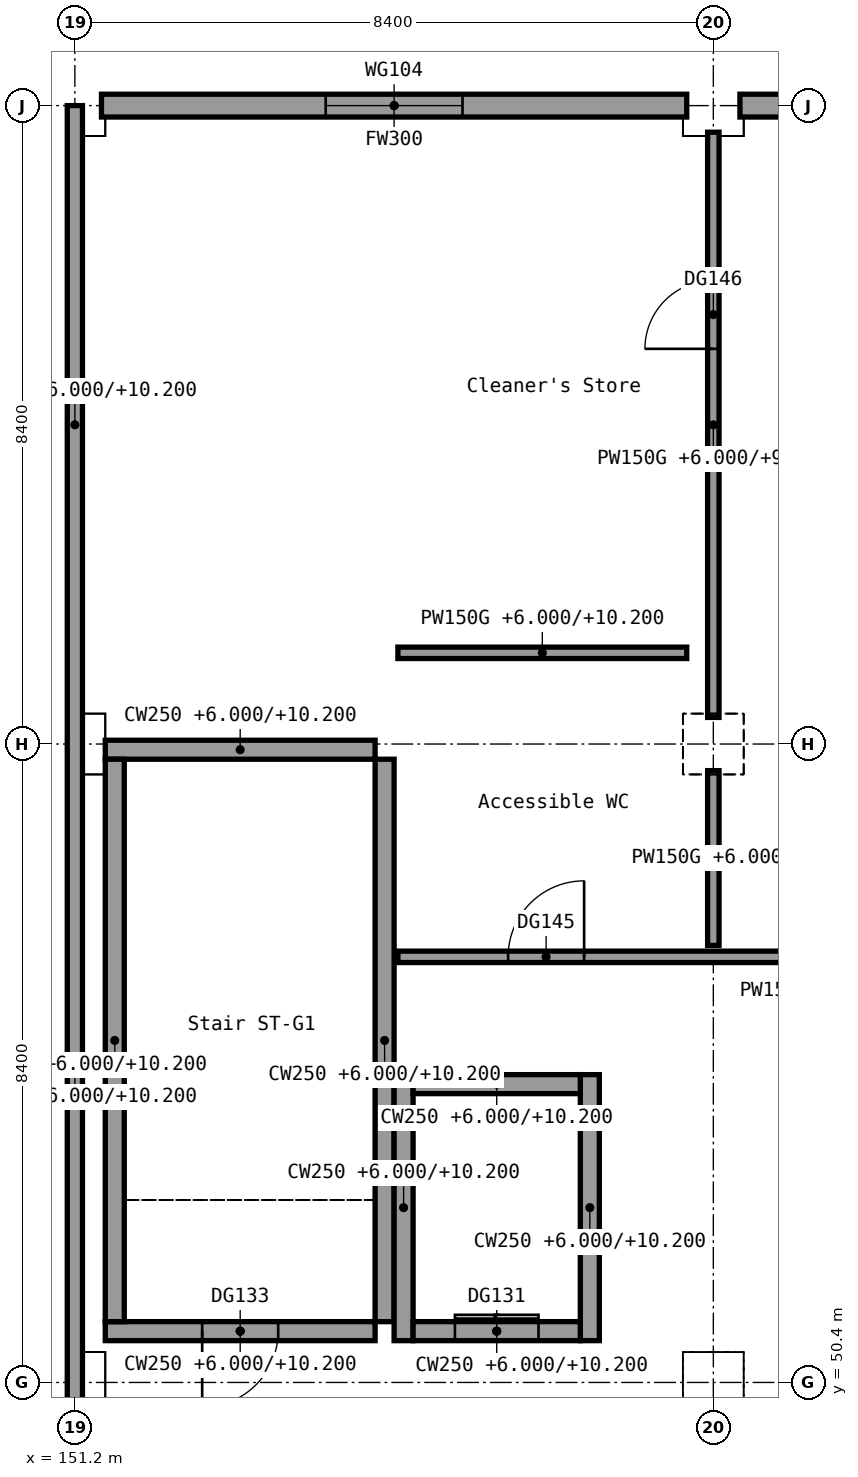
"""IFC4 building model, lengths in metres.
Left out: names, types, materials, properties, quantities, classifications, styles, units other than length and angle.
Written with IfcOpenShell. Run it as: python <this file> out.ifc"""

import sys

from ifc_helpers import new_model, si_unit, direction, frame, frame_2d, origin, origin_2d, place, context, subcontext, project, spatial, rectangle, extrude, element, fill, save


model = new_model("IFC4")
c1 = context("Model", 3, precision=1e-05, world=origin(), true_north=direction((0.0, 1.0)))
c2 = subcontext(c1, "Body", "Model", "MODEL_VIEW")
j1 = project(units=[si_unit("LENGTHUNIT", "METRE"), si_unit("PLANEANGLEUNIT", "RADIAN")], contexts=[c1])
p1 = place(None, origin())
s1 = spatial("IfcSite", under=j1, at=p1, CompositionType="ELEMENT")
p2 = place(p1, origin())
s2 = spatial("IfcBuilding", under=s1, at=p2, CompositionType="ELEMENT")
p3 = place(p2, frame((0.0, 0.0, 6.0)))
s3 = spatial("IfcBuildingStorey", under=s2, at=p3, CompositionType="ELEMENT", Elevation=6.0)
for number, where, z_axis, x_axis in (
    (1, (151.2, 50.4, 0.0), (0.0, 0.0, 1.0), (1.0, 0.0, 0.0)),
    (2, (151.2, 58.8, 0.0), (0.0, 0.0, 1.0), (1.0, 0.0, 0.0)),
    (3, (151.2, 67.2, 0.0), (0.0, 0.0, 1.0), (1.0, 0.0, 0.0)),
    (4, (159.6, 50.4, 0.0), (0.0, 0.0, 1.0), (1.0, 0.0, 0.0)),
    (5, (159.6, 58.8, 0.0), (0.0, 0.0, 1.0), (1.0, 0.0, 0.0)),
    (6, (159.6, 67.2, 0.0), (0.0, 0.0, 1.0), (1.0, 0.0, 0.0)),
):
    element("IfcColumn", number, at=place(p3, frame(where, z_axis=z_axis, x_axis=x_axis)), inside=s3, PredefinedType="COLUMN", context=c2, shape_type="SweptSolid", body=[
        extrude(rectangle(XDim=0.7, YDim=0.7, at=origin_2d()), origin(), (0.0, 0.0, 1.0), 4.2),
    ])
p4 = place(p3, frame((151.55, 67.2, 0.0), z_axis=(0.0, 0.0, 1.0), x_axis=(1.0, 0.0, 0.0)))
e7 = element("IfcWall", 7, at=p4, inside=s3, PredefinedType="STANDARD", context=c2, shape_type="SweptSolid", body=[
    extrude(rectangle(XDim=7.7, YDim=0.3, at=frame_2d((3.85, 0.0))), origin(), (0.0, 0.0, 1.0), 4.2),
])
p5 = place(p4, frame((2.95, 0.0, 0.9)))
e8 = element("IfcOpeningElement", 8, at=p5, cuts=e7, PredefinedType="OPENING", context=c2, shape_type="SweptSolid", body=[
    extrude(rectangle(XDim=1.8, YDim=1.5, at=frame_2d((0.9, 0.75))), frame((0.0, 0.15, 0.0), z_axis=(0.0, -1.0, 0.0), x_axis=(1.0, 0.0, 0.0)), (0.0, 0.0, 1.0), 0.3),
])
p6 = place(p3, frame((159.95, 67.2, 0.0), z_axis=(0.0, 0.0, 1.0), x_axis=(1.0, 0.0, 0.0)))
e9 = element("IfcWall", 9, at=p6, inside=s3, PredefinedType="STANDARD", context=c2, shape_type="SweptSolid", body=[
    extrude(rectangle(XDim=7.7, YDim=0.3, at=frame_2d((3.85, 0.0))), origin(), (0.0, 0.0, 1.0), 4.2),
])
p7 = place(p6, frame((2.95, 0.0, 0.9)))
e10 = element("IfcOpeningElement", 10, at=p7, cuts=e9, PredefinedType="OPENING", context=c2, shape_type="SweptSolid", body=[
    extrude(rectangle(XDim=1.8, YDim=1.5, at=frame_2d((0.9, 0.75))), frame((0.0, 0.15, 0.0), z_axis=(0.0, -1.0, 0.0), x_axis=(1.0, 0.0, 0.0)), (0.0, 0.0, 1.0), 0.3),
])
p8 = place(p3, frame((151.2, 8.4, 4.5), z_axis=(0.0, 0.0, 1.0), x_axis=(0.0, 1.0, 0.0)))
e11 = element("IfcWall", 11, at=p8, inside=s3, PredefinedType="PARAPET", context=c2, shape_type="SweptSolid", body=[
    extrude(rectangle(XDim=58.8, YDim=0.2, at=frame_2d((29.4, 0.0))), origin(), (0.0, 0.0, 1.0), 1.1),
])
p9 = place(p3, frame((155.15, 51.075, 0.0), z_axis=(0.0, 0.0, 1.0), x_axis=(-1.0, 0.0, 0.0)))
e12 = element("IfcWall", 12, at=p9, inside=s3, PredefinedType="SHEAR", context=c2, shape_type="SweptSolid", body=[
    extrude(rectangle(XDim=3.55, YDim=0.25, at=frame_2d((1.775, 0.0))), origin(), (0.0, 0.0, 1.0), 4.2),
])
p10 = place(p9, frame((1.275, 0.0, 0.0)))
e13 = element("IfcOpeningElement", 13, at=p10, cuts=e12, PredefinedType="OPENING", context=c2, shape_type="SweptSolid", body=[
    extrude(rectangle(XDim=1.0, YDim=2.1, at=frame_2d((0.5, 1.05))), frame((0.0, 0.125, 0.0), z_axis=(0.0, -1.0, 0.0), x_axis=(1.0, 0.0, 0.0)), (0.0, 0.0, 1.0), 0.25),
])
p11 = place(p3, frame((155.15, 58.725, 0.0), z_axis=(0.0, 0.0, 1.0), x_axis=(-1.0, 0.0, 0.0)))
e14 = element("IfcWall", 14, at=p11, inside=s3, PredefinedType="SHEAR", context=c2, shape_type="SweptSolid", body=[
    extrude(rectangle(XDim=3.55, YDim=0.25, at=frame_2d((1.775, 0.0))), origin(), (0.0, 0.0, 1.0), 4.2),
])
for number, where, z_axis, x_axis in (
    (15, (151.725, 51.2, 0.0), (0.0, 0.0, 1.0), (0.0, 1.0, 0.0)),
    (16, (155.275, 51.2, 0.0), (0.0, 0.0, 1.0), (0.0, 1.0, 0.0)),
):
    element("IfcWall", number, at=place(p3, frame(where, z_axis=z_axis, x_axis=x_axis)), inside=s3, PredefinedType="SHEAR", context=c2, shape_type="SweptSolid", body=[
        extrude(rectangle(XDim=7.4, YDim=0.25, at=frame_2d((3.7, 0.0))), origin(), (0.0, 0.0, 1.0), 4.2),
    ])
for number, where, z_axis, x_axis in (
    (17, (155.525, 50.95, 0.0), (0.0, 0.0, 1.0), (0.0, 1.0, 0.0)),
    (18, (157.975, 50.95, 0.0), (0.0, 0.0, 1.0), (0.0, 1.0, 0.0)),
):
    element("IfcWall", number, at=place(p3, frame(where, z_axis=z_axis, x_axis=x_axis)), inside=s3, PredefinedType="SHEAR", context=c2, shape_type="SweptSolid", body=[
        extrude(rectangle(XDim=3.5, YDim=0.25, at=frame_2d((1.75, 0.0))), origin(), (0.0, 0.0, 1.0), 4.2),
    ])
p12 = place(p3, frame((155.65, 51.075, 0.0), z_axis=(0.0, 0.0, 1.0), x_axis=(1.0, 0.0, 0.0)))
e19 = element("IfcWall", 19, at=p12, inside=s3, PredefinedType="SHEAR", context=c2, shape_type="SweptSolid", body=[
    extrude(rectangle(XDim=2.2, YDim=0.25, at=frame_2d((1.1, 0.0))), origin(), (0.0, 0.0, 1.0), 4.2),
])
p13 = place(p12, frame((0.55, 0.0, 0.0)))
e20 = element("IfcOpeningElement", 20, at=p13, cuts=e19, PredefinedType="OPENING", context=c2, shape_type="SweptSolid", body=[
    extrude(rectangle(XDim=1.1, YDim=2.1, at=frame_2d((0.55, 1.05))), frame((0.0, 0.125, 0.0), z_axis=(0.0, -1.0, 0.0), x_axis=(1.0, 0.0, 0.0)), (0.0, 0.0, 1.0), 0.25),
])
p14 = place(p3, frame((155.65, 54.325, 0.0), z_axis=(0.0, 0.0, 1.0), x_axis=(1.0, 0.0, 0.0)))
e21 = element("IfcWall", 21, at=p14, inside=s3, PredefinedType="SHEAR", context=c2, shape_type="SweptSolid", body=[
    extrude(rectangle(XDim=2.2, YDim=0.25, at=frame_2d((1.1, 0.0))), origin(), (0.0, 0.0, 1.0), 4.2),
])
p15 = place(p3, frame((155.45, 56.0, 0.0), z_axis=(0.0, 0.0, 1.0), x_axis=(1.0, 0.0, 0.0)))
e22 = element("IfcWall", 22, at=p15, inside=s3, PredefinedType="PARTITIONING", context=c2, shape_type="SweptSolid", body=[
    extrude(rectangle(XDim=12.2, YDim=0.15, at=frame_2d((6.1, 0.0))), origin(), (0.0, 0.0, 1.0), 4.2),
])
p16 = place(p15, frame((7.55, 0.0, 0.0)))
e23 = element("IfcOpeningElement", 23, at=p16, cuts=e22, PredefinedType="OPENING", context=c2, shape_type="SweptSolid", body=[
    extrude(rectangle(XDim=1.0, YDim=2.1, at=frame_2d((0.5, 1.05))), frame((0.0, 0.075, 0.0), z_axis=(0.0, -1.0, 0.0), x_axis=(1.0, 0.0, 0.0)), (0.0, 0.0, 1.0), 0.15),
])
p17 = place(p15, frame((1.45, 0.0, 0.0)))
e24 = element("IfcOpeningElement", 24, at=p17, cuts=e22, PredefinedType="OPENING", context=c2, shape_type="SweptSolid", body=[
    extrude(rectangle(XDim=1.0, YDim=2.1, at=frame_2d((0.5, 1.05))), frame((0.0, 0.075, 0.0), z_axis=(0.0, -1.0, 0.0), x_axis=(1.0, 0.0, 0.0)), (0.0, 0.0, 1.0), 0.15),
])
p18 = place(p3, frame((159.6, 56.15, 0.0), z_axis=(0.0, 0.0, 1.0), x_axis=(0.0, 1.0, 0.0)))
e25 = element("IfcWall", 25, at=p18, inside=s3, PredefinedType="PARTITIONING", context=c2, shape_type="SweptSolid", body=[
    extrude(rectangle(XDim=2.3, YDim=0.15, at=frame_2d((1.15, 0.0))), origin(), (0.0, 0.0, 1.0), 3.55),
])
p19 = place(p3, frame((159.6, 59.15, 0.0), z_axis=(0.0, 0.0, 1.0), x_axis=(0.0, 1.0, 0.0)))
e26 = element("IfcWall", 26, at=p19, inside=s3, PredefinedType="PARTITIONING", context=c2, shape_type="SweptSolid", body=[
    extrude(rectangle(XDim=7.7, YDim=0.15, at=frame_2d((3.85, 0.0))), origin(), (0.0, 0.0, 1.0), 3.55),
])
p20 = place(p19, frame((4.85, 0.0, 0.0)))
e27 = element("IfcOpeningElement", 27, at=p20, cuts=e26, PredefinedType="OPENING", context=c2, shape_type="SweptSolid", body=[
    extrude(rectangle(XDim=0.9, YDim=2.1, at=frame_2d((0.45, 1.05))), frame((0.0, 0.075, 0.0), z_axis=(0.0, -1.0, 0.0), x_axis=(1.0, 0.0, 0.0)), (0.0, 0.0, 1.0), 0.15),
])
p21 = place(p3, frame((155.45, 60.0, 0.0), z_axis=(0.0, 0.0, 1.0), x_axis=(1.0, 0.0, 0.0)))
e28 = element("IfcWall", 28, at=p21, inside=s3, PredefinedType="PARTITIONING", context=c2, shape_type="SweptSolid", body=[
    extrude(rectangle(XDim=3.8, YDim=0.15, at=frame_2d((1.9, 0.0))), origin(), (0.0, 0.0, 1.0), 4.2),
])
p22 = place(p13, origin())
e29 = element("IfcDoor", 29, at=p22, inside=s3, OperationType="DOUBLE_DOOR_SLIDING", PredefinedType="DOOR", context=c2, shape_type="SweptSolid", body=[
    extrude(rectangle(XDim=1.1, YDim=2.1, at=frame_2d((0.55, 1.05))), frame((0.0, 0.025, 0.0), z_axis=(0.0, -1.0, 0.0), x_axis=(1.0, 0.0, 0.0)), (0.0, 0.0, 1.0), 0.05),
])
fill(e20, e29)
p23 = place(p10, origin())
e30 = element("IfcDoor", 30, at=p23, inside=s3, OperationType="SINGLE_SWING_RIGHT", PredefinedType="DOOR", context=c2, shape_type="SweptSolid", body=[
    extrude(rectangle(XDim=1.0, YDim=2.1, at=frame_2d((0.5, 1.05))), frame((0.0, 0.025, 0.0), z_axis=(0.0, -1.0, 0.0), x_axis=(1.0, 0.0, 0.0)), (0.0, 0.0, 1.0), 0.05),
])
fill(e13, e30)
p24 = place(p17, origin())
e31 = element("IfcDoor", 31, at=p24, inside=s3, OperationType="SINGLE_SWING_RIGHT", PredefinedType="DOOR", context=c2, shape_type="SweptSolid", body=[
    extrude(rectangle(XDim=1.0, YDim=2.1, at=frame_2d((0.5, 1.05))), frame((0.0, 0.025, 0.0), z_axis=(0.0, -1.0, 0.0), x_axis=(1.0, 0.0, 0.0)), (0.0, 0.0, 1.0), 0.05),
])
fill(e24, e31)
p25 = place(p20, origin())
e32 = element("IfcDoor", 32, at=p25, inside=s3, OperationType="SINGLE_SWING_LEFT", PredefinedType="DOOR", context=c2, shape_type="SweptSolid", body=[
    extrude(rectangle(XDim=0.9, YDim=2.1, at=frame_2d((0.45, 1.05))), frame((0.0, 0.025, 0.0), z_axis=(0.0, -1.0, 0.0), x_axis=(1.0, 0.0, 0.0)), (0.0, 0.0, 1.0), 0.05),
])
fill(e27, e32)
p26 = place(p5, origin())
e33 = element("IfcWindow", 33, at=p26, inside=s3, PartitioningType="SINGLE_PANEL", PredefinedType="WINDOW", context=c2, shape_type="SweptSolid", body=[
    extrude(rectangle(XDim=1.8, YDim=1.5, at=frame_2d((0.9, 0.75))), frame((0.0, 0.03, 0.0), z_axis=(0.0, -1.0, 0.0), x_axis=(1.0, 0.0, 0.0)), (0.0, 0.0, 1.0), 0.06),
])
fill(e8, e33)
save(model, sys.argv[1])
